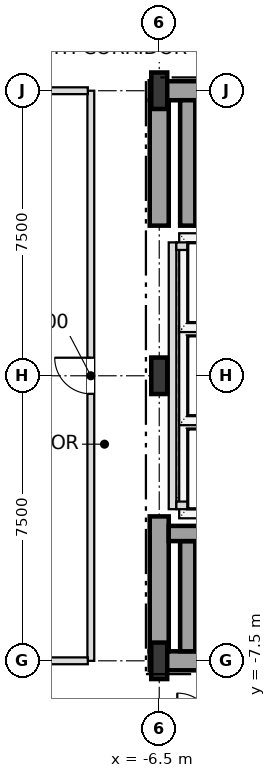
"""IFC4 building model, lengths in metres.
Left out: names, types, materials, properties, quantities, classifications, styles, units other than length and angle.
Written with IfcOpenShell. Run it as: python <this file> out.ifc"""

import sys

from ifc_helpers import new_model, si_unit, direction, frame, frame_2d, origin, origin_2d, place, context, subcontext, project, spatial, rectangle, i_section, extrude, element, fill, save


model = new_model("IFC4")
c1 = context("Model", 3, precision=1e-05, world=origin(), true_north=direction((0.0, 1.0)))
c2 = subcontext(c1, "Body", "Model", "MODEL_VIEW")
j1 = project(units=[si_unit("LENGTHUNIT", "METRE"), si_unit("PLANEANGLEUNIT", "RADIAN")], contexts=[c1])
p1 = place(None, origin())
s1 = spatial("IfcSite", under=j1, at=p1, CompositionType="ELEMENT")
p2 = place(p1, origin())
s2 = spatial("IfcBuilding", under=s1, at=p2, CompositionType="ELEMENT")
p3 = place(p2, frame((0.0, 0.0, 22.2)))
s3 = spatial("IfcBuildingStorey", under=s2, at=p3, CompositionType="ELEMENT", Elevation=22.2)
for number, where, z_axis, x_axis in (
    (1, (-6.5, -7.5, 0.0), (0.0, 0.0, 1.0), (1.0, 0.0, 0.0)),
    (2, (-6.5, 0.0, 0.0), (0.0, 0.0, 1.0), (1.0, 0.0, 0.0)),
    (3, (-6.5, 7.5, 0.0), (0.0, 0.0, 1.0), (1.0, 0.0, 0.0)),
):
    element("IfcColumn", number, at=place(p3, frame(where, z_axis=z_axis, x_axis=x_axis)), inside=s3, PredefinedType="COLUMN", context=c2, shape_type="SweptSolid", body=[
        extrude(i_section(OverallWidth=0.42, OverallDepth=0.96, WebThickness=0.022, FlangeThickness=0.034, at=origin_2d()), origin(), (0.0, 0.0, 1.0), 5.4),
    ])
p4 = place(p3, frame((-6.75, -7.5, 0.0), z_axis=(0.0, 0.0, 1.0), x_axis=(1.0, 0.0, 0.0)))
e4 = element("IfcWall", 4, at=p4, inside=s3, PredefinedType="SHEAR", context=c2, shape_type="SweptSolid", body=[
    extrude(rectangle(XDim=6.75, YDim=0.5, at=frame_2d((3.375, 0.0))), origin(), (0.0, 0.0, 1.0), 5.0),
])
p5 = place(p3, frame((-6.75, 7.5, 0.0), z_axis=(0.0, 0.0, 1.0), x_axis=(1.0, 0.0, 0.0)))
e5 = element("IfcWall", 5, at=p5, inside=s3, PredefinedType="SHEAR", context=c2, shape_type="SweptSolid", body=[
    extrude(rectangle(XDim=6.75, YDim=0.5, at=frame_2d((3.375, 0.0))), origin(), (0.0, 0.0, 1.0), 5.0),
])
p6 = place(p5, frame((1.65, 0.0, 0.0)))
e6 = element("IfcOpeningElement", 6, at=p6, cuts=e5, PredefinedType="OPENING", context=c2, shape_type="SweptSolid", body=[
    extrude(rectangle(XDim=1.05, YDim=2.15, at=frame_2d((0.525, 1.075))), frame((0.0, 0.26, 0.0), z_axis=(0.0, -1.0, 0.0), x_axis=(1.0, 0.0, 0.0)), (0.0, 0.0, 1.0), 0.52),
])
p7 = place(p3, frame((-6.5, -7.25, 0.0), z_axis=(0.0, 0.0, 1.0), x_axis=(0.0, 1.0, 0.0)))
e7 = element("IfcWall", 7, at=p7, inside=s3, PredefinedType="SHEAR", context=c2, shape_type="SweptSolid", body=[
    extrude(rectangle(XDim=3.55, YDim=0.5, at=frame_2d((1.775, 0.0))), origin(), (0.0, 0.0, 1.0), 5.0),
])
p8 = place(p3, frame((-6.5, 3.95, 0.0), z_axis=(0.0, 0.0, 1.0), x_axis=(0.0, 1.0, 0.0)))
e8 = element("IfcWall", 8, at=p8, inside=s3, PredefinedType="SHEAR", context=c2, shape_type="SweptSolid", body=[
    extrude(rectangle(XDim=3.3, YDim=0.5, at=frame_2d((1.65, 0.0))), origin(), (0.0, 0.0, 1.0), 5.0),
])
p9 = place(p3, frame((-5.75, -7.25, 0.0), z_axis=(0.0, 0.0, 1.0), x_axis=(0.0, 1.0, 0.0)))
e9 = element("IfcWall", 9, at=p9, inside=s3, PredefinedType="SHEAR", context=c2, shape_type="SweptSolid", body=[
    extrude(rectangle(XDim=2.9, YDim=0.4, at=frame_2d((1.45, 0.0))), origin(), (0.0, 0.0, 1.0), 5.0),
])
p10 = place(p3, frame((-6.25, -4.15, 0.0), z_axis=(0.0, 0.0, 1.0), x_axis=(1.0, 0.0, 0.0)))
e10 = element("IfcWall", 10, at=p10, inside=s3, PredefinedType="SHEAR", context=c2, shape_type="SweptSolid", body=[
    extrude(rectangle(XDim=7.78, YDim=0.4, at=frame_2d((3.89, 0.0))), origin(), (0.0, 0.0, 1.0), 5.0),
])
p11 = place(p3, frame((-5.55, 4.15, 0.0), z_axis=(0.0, 0.0, 1.0), x_axis=(1.0, 0.0, 0.0)))
e11 = element("IfcWall", 11, at=p11, inside=s3, PredefinedType="SHEAR", context=c2, shape_type="SweptSolid", body=[
    extrude(rectangle(XDim=7.08, YDim=0.4, at=frame_2d((3.54, 0.0))), origin(), (0.0, 0.0, 1.0), 5.0),
])
p12 = place(p3, frame((-5.75, 3.95, 0.0), z_axis=(0.0, 0.0, 1.0), x_axis=(0.0, 1.0, 0.0)))
e12 = element("IfcWall", 12, at=p12, inside=s3, PredefinedType="SHEAR", context=c2, shape_type="SweptSolid", body=[
    extrude(rectangle(XDim=3.3, YDim=0.4, at=frame_2d((1.65, 0.0))), origin(), (0.0, 0.0, 1.0), 5.0),
])
p13 = place(p3, frame((-6.15, -3.51, 0.0), z_axis=(0.0, 0.0, 1.0), x_axis=(0.0, 1.0, 0.0)))
e13 = element("IfcWall", 13, at=p13, inside=s3, PredefinedType="SOLIDWALL", context=c2, shape_type="SweptSolid", body=[
    extrude(rectangle(XDim=7.02, YDim=0.2, at=frame_2d((3.51, 0.0))), origin(), (0.0, 0.0, 1.0), 5.0),
])
for number, where, z_axis, x_axis in (
    (14, (-6.05, -3.41, 0.0), (0.0, 0.0, 1.0), (1.0, 0.0, 0.0)),
    (15, (-6.05, 3.41, 0.0), (0.0, 0.0, 1.0), (1.0, 0.0, 0.0)),
):
    element("IfcWall", number, at=place(p3, frame(where, z_axis=z_axis, x_axis=x_axis)), inside=s3, PredefinedType="SOLIDWALL", context=c2, shape_type="SweptSolid", body=[
        extrude(rectangle(XDim=2.2, YDim=0.2, at=frame_2d((1.1, 0.0))), origin(), (0.0, 0.0, 1.0), 5.0),
    ])
p14 = place(p3, frame((-8.3, -7.5, 0.0), z_axis=(0.0, 0.0, 1.0), x_axis=(0.0, 1.0, 0.0)))
e16 = element("IfcWall", 16, at=p14, inside=s3, PredefinedType="PARTITIONING", context=c2, shape_type="SweptSolid", body=[
    extrude(rectangle(XDim=15.0, YDim=0.18, at=frame_2d((7.5, 0.0))), origin(), (0.0, 0.0, 1.0), 5.0),
])
p15 = place(p14, frame((7.025, 0.0, 0.0)))
e17 = element("IfcOpeningElement", 17, at=p15, cuts=e16, PredefinedType="OPENING", context=c2, shape_type="SweptSolid", body=[
    extrude(rectangle(XDim=0.95, YDim=2.15, at=frame_2d((0.475, 1.075))), frame((0.0, 0.1, 0.0), z_axis=(0.0, -1.0, 0.0), x_axis=(1.0, 0.0, 0.0)), (0.0, 0.0, 1.0), 0.2),
])
for number, where, z_axis, x_axis in (
    (18, (-22.695, -7.5, 0.0), (0.0, 0.0, 1.0), (1.0, 0.0, 0.0)),
    (19, (-22.695, 7.5, 0.0), (0.0, 0.0, 1.0), (1.0, 0.0, 0.0)),
):
    element("IfcWall", number, at=place(p3, frame(where, z_axis=z_axis, x_axis=x_axis)), inside=s3, PredefinedType="PARTITIONING", context=c2, shape_type="SweptSolid", body=[
        extrude(rectangle(XDim=14.315, YDim=0.18, at=frame_2d((7.158, 0.0))), origin(), (0.0, 0.0, 1.0), 4.356),
    ])
p16 = place(p15, origin())
e20 = element("IfcDoor", 20, at=p16, inside=s3, OperationType="SINGLE_SWING_RIGHT", PredefinedType="DOOR", context=c2, shape_type="SweptSolid", body=[
    extrude(rectangle(XDim=0.95, YDim=2.15, at=frame_2d((0.475, 1.075))), frame((0.0, 0.025, 0.0), z_axis=(0.0, -1.0, 0.0), x_axis=(1.0, 0.0, 0.0)), (0.0, 0.0, 1.0), 0.05),
])
fill(e17, e20)
save(model, sys.argv[1])
